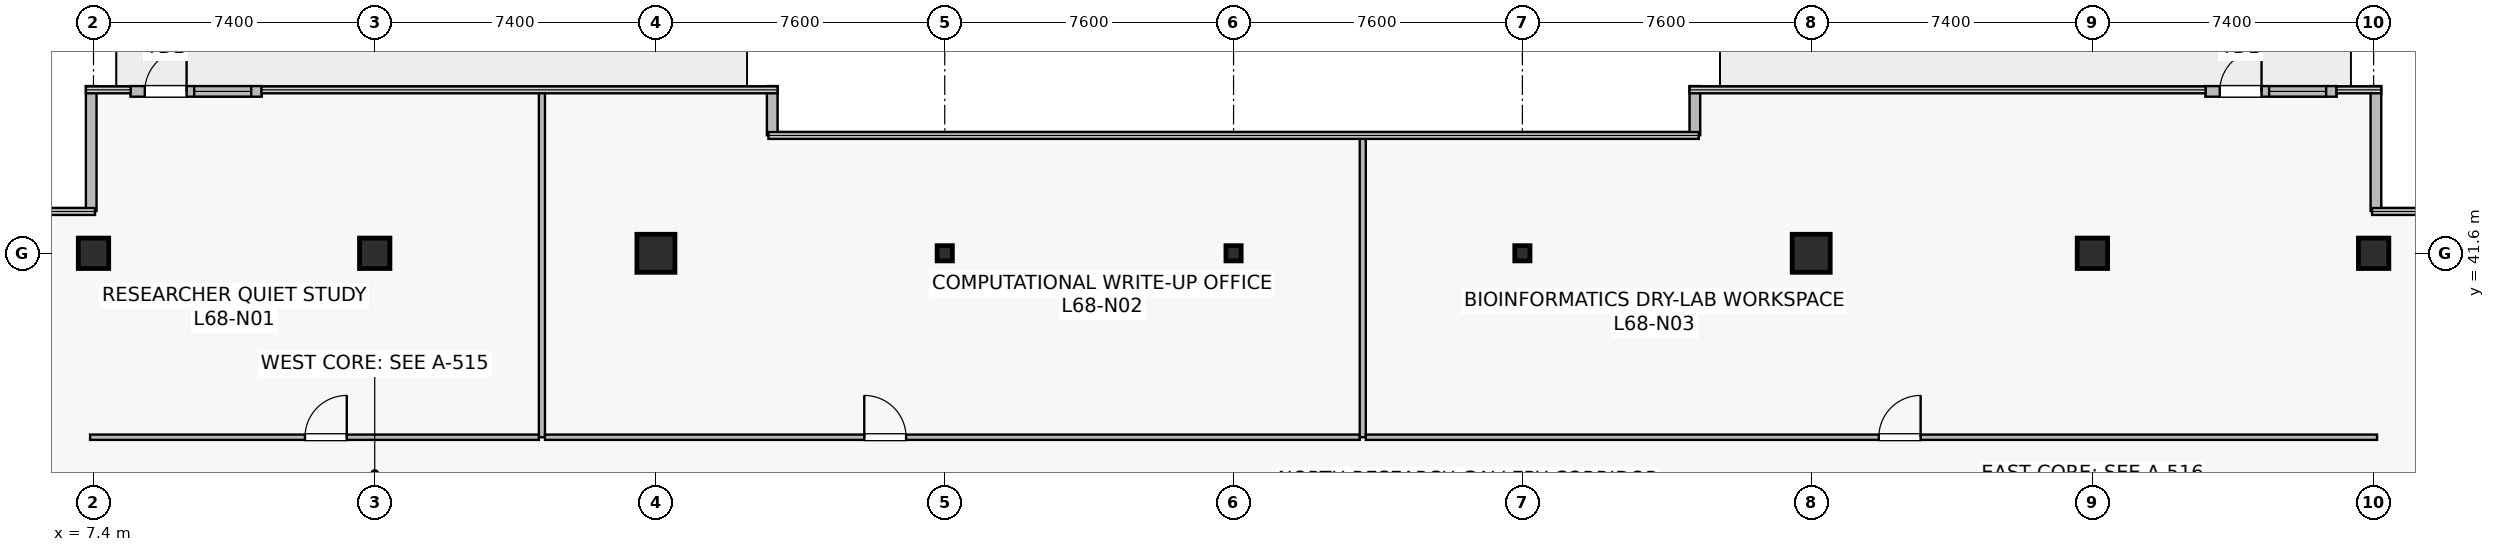
"""IFC4 building model, lengths in metres.
Left out: names, types, materials, properties, quantities, classifications, styles, units other than length and angle.
Written with IfcOpenShell. Run it as: python <this file> out.ifc"""

import sys

from ifc_helpers import new_model, si_unit, direction, frame, frame_2d, origin, origin_2d, place, context, subcontext, project, spatial, rectangle, hollow_rectangle, extrude, source, transform, mapped, element, fill, save


model = new_model("IFC4")
c1 = context("Model", 3, precision=1e-05, world=origin(), true_north=direction((0.0, 1.0)))
c2 = subcontext(c1, "Body", "Model", "MODEL_VIEW")
j1 = project(units=[si_unit("LENGTHUNIT", "METRE"), si_unit("PLANEANGLEUNIT", "RADIAN")], contexts=[c1])
p1 = place(None, origin())
s1 = spatial("IfcSite", under=j1, at=p1, CompositionType="ELEMENT")
p2 = place(p1, origin())
s2 = spatial("IfcBuilding", under=s1, at=p2, CompositionType="ELEMENT")
p3 = place(p2, frame((0.0, 0.0, 283.4)))
s3 = spatial("IfcBuildingStorey", under=s2, at=p3, CompositionType="ELEMENT", Elevation=283.4)
m1 = source(origin(), c2, "Body", "SweptSolid", [
    extrude(rectangle(XDim=0.8, YDim=0.8, at=origin_2d()), origin(), (0.0, 0.0, 1.0), 4.1),
])
p4 = place(p3, frame((14.8, 41.6, 0.0), z_axis=(0.0, 0.0, 1.0), x_axis=(1.0, 0.0, 0.0)))
e1 = element("IfcColumn", 1, at=p4, inside=s3, PredefinedType="COLUMN", context=c2, shape_type="MappedRepresentation", body=[
    mapped(m1, transform((0.0, 0.0, 0.0), scale=1.0)),
])
m2 = source(origin(), c2, "Body", "SweptSolid", [
    extrude(rectangle(XDim=1.0, YDim=1.0, at=origin_2d()), origin(), (0.0, 0.0, 1.0), 4.1),
])
for number, where, z_axis, x_axis in (
    (2, (22.2, 41.6, 0.0), (0.0, 0.0, 1.0), (1.0, 0.0, 0.0)),
    (3, (52.6, 41.6, 0.0), (0.0, 0.0, 1.0), (1.0, 0.0, 0.0)),
):
    element("IfcColumn", number, at=place(p3, frame(where, z_axis=z_axis, x_axis=x_axis)), inside=s3, PredefinedType="COLUMN", context=c2, shape_type="MappedRepresentation", body=[
        mapped(m2, transform((0.0, 0.0, 0.0), scale=1.0)),
    ])
for number, where, z_axis, x_axis in (
    (4, (60.0, 41.6, 0.0), (0.0, 0.0, 1.0), (1.0, 0.0, 0.0)),
    (5, (7.4, 41.6, 0.0), (0.0, 0.0, 1.0), (1.0, 0.0, 0.0)),
    (6, (67.4, 41.6, 0.0), (0.0, 0.0, 1.0), (1.0, 0.0, 0.0)),
):
    element("IfcColumn", number, at=place(p3, frame(where, z_axis=z_axis, x_axis=x_axis)), inside=s3, PredefinedType="COLUMN", context=c2, shape_type="MappedRepresentation", body=[
        mapped(m1, transform((0.0, 0.0, 0.0), scale=1.0)),
    ])
m3 = source(origin(), c2, "Body", "SweptSolid", [
    extrude(hollow_rectangle(XDim=0.4, YDim=0.4, WallThickness=0.019, at=origin_2d()), origin(), (0.0, 0.0, 1.0), 4.1),
])
for number, where, z_axis, x_axis in (
    (7, (29.8, 41.6, 0.0), (0.0, 0.0, 1.0), (1.0, 0.0, 0.0)),
    (8, (37.4, 41.6, 0.0), (0.0, 0.0, 1.0), (1.0, 0.0, 0.0)),
    (9, (45.0, 41.6, 0.0), (0.0, 0.0, 1.0), (1.0, 0.0, 0.0)),
):
    element("IfcColumn", number, at=place(p3, frame(where, z_axis=z_axis, x_axis=x_axis)), inside=s3, PredefinedType="COLUMN", context=c2, shape_type="MappedRepresentation", body=[
        mapped(m3, transform((0.0, 0.0, 0.0), scale=1.0)),
    ])
p5 = place(p3, frame((8.372, 45.86, 0.0), z_axis=(0.0, 0.0, 1.0), x_axis=(1.0, 0.0, 0.0)))
e10 = element("IfcWall", 10, at=p5, inside=s3, PredefinedType="STANDARD", context=c2, shape_type="SweptSolid", body=[
    extrude(rectangle(XDim=3.456, YDim=0.28, at=frame_2d((1.728, 0.0))), origin(), (0.0, 0.0, 1.0), 3.8),
])
p6 = place(p5, frame((0.378, 0.0, 0.0)))
e11 = element("IfcOpeningElement", 11, at=p6, cuts=e10, PredefinedType="OPENING", context=c2, shape_type="SweptSolid", body=[
    extrude(rectangle(XDim=1.1, YDim=2.2, at=frame_2d((0.55, 1.1))), frame((0.0, 0.15, 0.0), z_axis=(0.0, -1.0, 0.0), x_axis=(1.0, 0.0, 0.0)), (0.0, 0.0, 1.0), 0.3),
])
p7 = place(p5, frame((1.678, 0.0, 0.9)))
e12 = element("IfcOpeningElement", 12, at=p7, cuts=e10, PredefinedType="OPENING", context=c2, shape_type="SweptSolid", body=[
    extrude(rectangle(XDim=1.5, YDim=2.2, at=frame_2d((0.75, 1.1))), frame((0.0, 0.15, 0.0), z_axis=(0.0, -1.0, 0.0), x_axis=(1.0, 0.0, 0.0)), (0.0, 0.0, 1.0), 0.3),
])
p8 = place(p3, frame((62.972, 45.86, 0.0), z_axis=(0.0, 0.0, 1.0), x_axis=(1.0, 0.0, 0.0)))
e13 = element("IfcWall", 13, at=p8, inside=s3, PredefinedType="STANDARD", context=c2, shape_type="SweptSolid", body=[
    extrude(rectangle(XDim=3.456, YDim=0.28, at=frame_2d((1.728, 0.0))), origin(), (0.0, 0.0, 1.0), 3.8),
])
p9 = place(p8, frame((0.378, 0.0, 0.0)))
e14 = element("IfcOpeningElement", 14, at=p9, cuts=e13, PredefinedType="OPENING", context=c2, shape_type="SweptSolid", body=[
    extrude(rectangle(XDim=1.1, YDim=2.2, at=frame_2d((0.55, 1.1))), frame((0.0, 0.15, 0.0), z_axis=(0.0, -1.0, 0.0), x_axis=(1.0, 0.0, 0.0)), (0.0, 0.0, 1.0), 0.3),
])
p10 = place(p8, frame((1.678, 0.0, 0.9)))
e15 = element("IfcOpeningElement", 15, at=p10, cuts=e13, PredefinedType="OPENING", context=c2, shape_type="SweptSolid", body=[
    extrude(rectangle(XDim=1.5, YDim=2.2, at=frame_2d((0.75, 1.1))), frame((0.0, 0.15, 0.0), z_axis=(0.0, -1.0, 0.0), x_axis=(1.0, 0.0, 0.0)), (0.0, 0.0, 1.0), 0.3),
])
p11 = place(p3, frame((67.46, 42.712, 0.0), z_axis=(0.0, 0.0, 1.0), x_axis=(0.0, 1.0, 0.0)))
e16 = element("IfcWall", 16, at=p11, inside=s3, PredefinedType="STANDARD", context=c2, shape_type="SweptSolid", body=[
    extrude(rectangle(XDim=3.288, YDim=0.28, at=frame_2d((1.644, 0.0))), origin(), (0.0, 0.0, 1.0), 3.8),
])
for number, where, z_axis, x_axis in (
    (17, (49.54, 46.0, 0.0), (0.0, 0.0, 1.0), (0.0, -1.0, 0.0)),
    (18, (25.26, 44.707, 0.0), (0.0, 0.0, 1.0), (0.0, 1.0, 0.0)),
):
    element("IfcWall", number, at=place(p3, frame(where, z_axis=z_axis, x_axis=x_axis)), inside=s3, PredefinedType="STANDARD", context=c2, shape_type="SweptSolid", body=[
        extrude(rectangle(XDim=1.293, YDim=0.28, at=frame_2d((0.646, 0.0))), origin(), (0.0, 0.0, 1.0), 3.8),
    ])
p12 = place(p3, frame((7.34, 46.0, 0.0), z_axis=(0.0, 0.0, 1.0), x_axis=(0.0, -1.0, 0.0)))
e19 = element("IfcWall", 19, at=p12, inside=s3, PredefinedType="STANDARD", context=c2, shape_type="SweptSolid", body=[
    extrude(rectangle(XDim=3.288, YDim=0.28, at=frame_2d((1.644, 0.0))), origin(), (0.0, 0.0, 1.0), 3.8),
])
p13 = place(p3, frame((7.31, 36.76, 0.0), z_axis=(0.0, 0.0, 1.0), x_axis=(1.0, 0.0, 0.0)))
e20 = element("IfcWall", 20, at=p13, inside=s3, PredefinedType="PARTITIONING", context=c2, shape_type="SweptSolid", body=[
    extrude(rectangle(XDim=11.81, YDim=0.14, at=frame_2d((5.905, 0.0))), origin(), (0.0, 0.0, 1.0), 3.197),
])
p14 = place(p13, frame((5.655, 0.0, 0.0)))
e21 = element("IfcOpeningElement", 21, at=p14, cuts=e20, PredefinedType="OPENING", context=c2, shape_type="SweptSolid", body=[
    extrude(rectangle(XDim=1.1, YDim=2.18, at=frame_2d((0.55, 1.09))), frame((0.0, 0.08, 0.0), z_axis=(0.0, -1.0, 0.0), x_axis=(1.0, 0.0, 0.0)), (0.0, 0.0, 1.0), 0.16),
])
p15 = place(p3, frame((19.2, 36.76, 0.0), z_axis=(0.0, 0.0, 1.0), x_axis=(0.0, 1.0, 0.0)))
e22 = element("IfcWall", 22, at=p15, inside=s3, PredefinedType="PARTITIONING", context=c2, shape_type="SweptSolid", body=[
    extrude(rectangle(XDim=9.13, YDim=0.16, at=frame_2d((4.565, 0.0))), origin(), (0.0, 0.0, 1.0), 3.135),
])
p16 = place(p3, frame((19.28, 36.76, 0.0), z_axis=(0.0, 0.0, 1.0), x_axis=(1.0, 0.0, 0.0)))
e23 = element("IfcWall", 23, at=p16, inside=s3, PredefinedType="PARTITIONING", context=c2, shape_type="SweptSolid", body=[
    extrude(rectangle(XDim=21.44, YDim=0.14, at=frame_2d((10.72, 0.0))), origin(), (0.0, 0.0, 1.0), 3.197),
])
p17 = place(p16, frame((8.402, 0.0, 0.0)))
e24 = element("IfcOpeningElement", 24, at=p17, cuts=e23, PredefinedType="OPENING", context=c2, shape_type="SweptSolid", body=[
    extrude(rectangle(XDim=1.1, YDim=2.18, at=frame_2d((0.55, 1.09))), frame((0.0, 0.08, 0.0), z_axis=(0.0, -1.0, 0.0), x_axis=(1.0, 0.0, 0.0)), (0.0, 0.0, 1.0), 0.16),
])
p18 = place(p3, frame((40.8, 36.76, 0.0), z_axis=(0.0, 0.0, 1.0), x_axis=(0.0, 1.0, 0.0)))
e25 = element("IfcWall", 25, at=p18, inside=s3, PredefinedType="PARTITIONING", context=c2, shape_type="SweptSolid", body=[
    extrude(rectangle(XDim=7.93, YDim=0.16, at=frame_2d((3.965, 0.0))), origin(), (0.0, 0.0, 1.0), 3.135),
])
p19 = place(p3, frame((40.88, 36.76, 0.0), z_axis=(0.0, 0.0, 1.0), x_axis=(1.0, 0.0, 0.0)))
e26 = element("IfcWall", 26, at=p19, inside=s3, PredefinedType="PARTITIONING", context=c2, shape_type="SweptSolid", body=[
    extrude(rectangle(XDim=26.61, YDim=0.14, at=frame_2d((13.305, 0.0))), origin(), (0.0, 0.0, 1.0), 3.197),
])
p20 = place(p19, frame((13.499, 0.0, 0.0)))
e27 = element("IfcOpeningElement", 27, at=p20, cuts=e26, PredefinedType="OPENING", context=c2, shape_type="SweptSolid", body=[
    extrude(rectangle(XDim=1.1, YDim=2.18, at=frame_2d((0.55, 1.09))), frame((0.0, 0.08, 0.0), z_axis=(0.0, -1.0, 0.0), x_axis=(1.0, 0.0, 0.0)), (0.0, 0.0, 1.0), 0.16),
])
m4 = source(origin(), c2, "Body", "SweptSolid", [
    extrude(rectangle(XDim=1.1, YDim=2.2, at=frame_2d((0.55, 1.1))), frame((0.0, 0.025, 0.0), z_axis=(0.0, -1.0, 0.0), x_axis=(1.0, 0.0, 0.0)), (0.0, 0.0, 1.0), 0.05),
])
p21 = place(p6, origin())
e28 = element("IfcDoor", 28, at=p21, inside=s3, OperationType="SINGLE_SWING_RIGHT", PredefinedType="DOOR", context=c2, shape_type="MappedRepresentation", body=[
    mapped(m4, transform((0.0, 0.0, 0.0), scale=1.0)),
])
fill(e11, e28)
m5 = source(origin(), c2, "Body", "SweptSolid", [
    extrude(rectangle(XDim=1.5, YDim=2.2, at=frame_2d((0.75, 1.1))), frame((0.0, 0.03, 0.0), z_axis=(0.0, -1.0, 0.0), x_axis=(1.0, 0.0, 0.0)), (0.0, 0.0, 1.0), 0.06),
])
p22 = place(p7, origin())
e29 = element("IfcWindow", 29, at=p22, inside=s3, PartitioningType="SINGLE_PANEL", PredefinedType="WINDOW", context=c2, shape_type="MappedRepresentation", body=[
    mapped(m5, transform((0.0, 0.0, 0.0), scale=1.0)),
])
fill(e12, e29)
p23 = place(p9, origin())
e30 = element("IfcDoor", 30, at=p23, inside=s3, OperationType="SINGLE_SWING_RIGHT", PredefinedType="DOOR", context=c2, shape_type="MappedRepresentation", body=[
    mapped(m4, transform((0.0, 0.0, 0.0), scale=1.0)),
])
fill(e14, e30)
p24 = place(p10, origin())
e31 = element("IfcWindow", 31, at=p24, inside=s3, PartitioningType="SINGLE_PANEL", PredefinedType="WINDOW", context=c2, shape_type="MappedRepresentation", body=[
    mapped(m5, transform((0.0, 0.0, 0.0), scale=1.0)),
])
fill(e15, e31)
m6 = source(origin(), c2, "Body", "SweptSolid", [
    extrude(rectangle(XDim=1.1, YDim=2.18, at=frame_2d((0.55, 1.09))), frame((0.0, 0.025, 0.0), z_axis=(0.0, -1.0, 0.0), x_axis=(1.0, 0.0, 0.0)), (0.0, 0.0, 1.0), 0.05),
])
p25 = place(p14, origin())
e32 = element("IfcDoor", 32, at=p25, inside=s3, OperationType="SINGLE_SWING_RIGHT", PredefinedType="DOOR", context=c2, shape_type="MappedRepresentation", body=[
    mapped(m6, transform((0.0, 0.0, 0.0), scale=1.0)),
])
fill(e21, e32)
p26 = place(p17, origin())
e33 = element("IfcDoor", 33, at=p26, inside=s3, OperationType="SINGLE_SWING_LEFT", PredefinedType="DOOR", context=c2, shape_type="MappedRepresentation", body=[
    mapped(m6, transform((0.0, 0.0, 0.0), scale=1.0)),
])
fill(e24, e33)
p27 = place(p20, origin())
e34 = element("IfcDoor", 34, at=p27, inside=s3, OperationType="SINGLE_SWING_RIGHT", PredefinedType="DOOR", context=c2, shape_type="MappedRepresentation", body=[
    mapped(m6, transform((0.0, 0.0, 0.0), scale=1.0)),
])
fill(e27, e34)
save(model, sys.argv[1])
